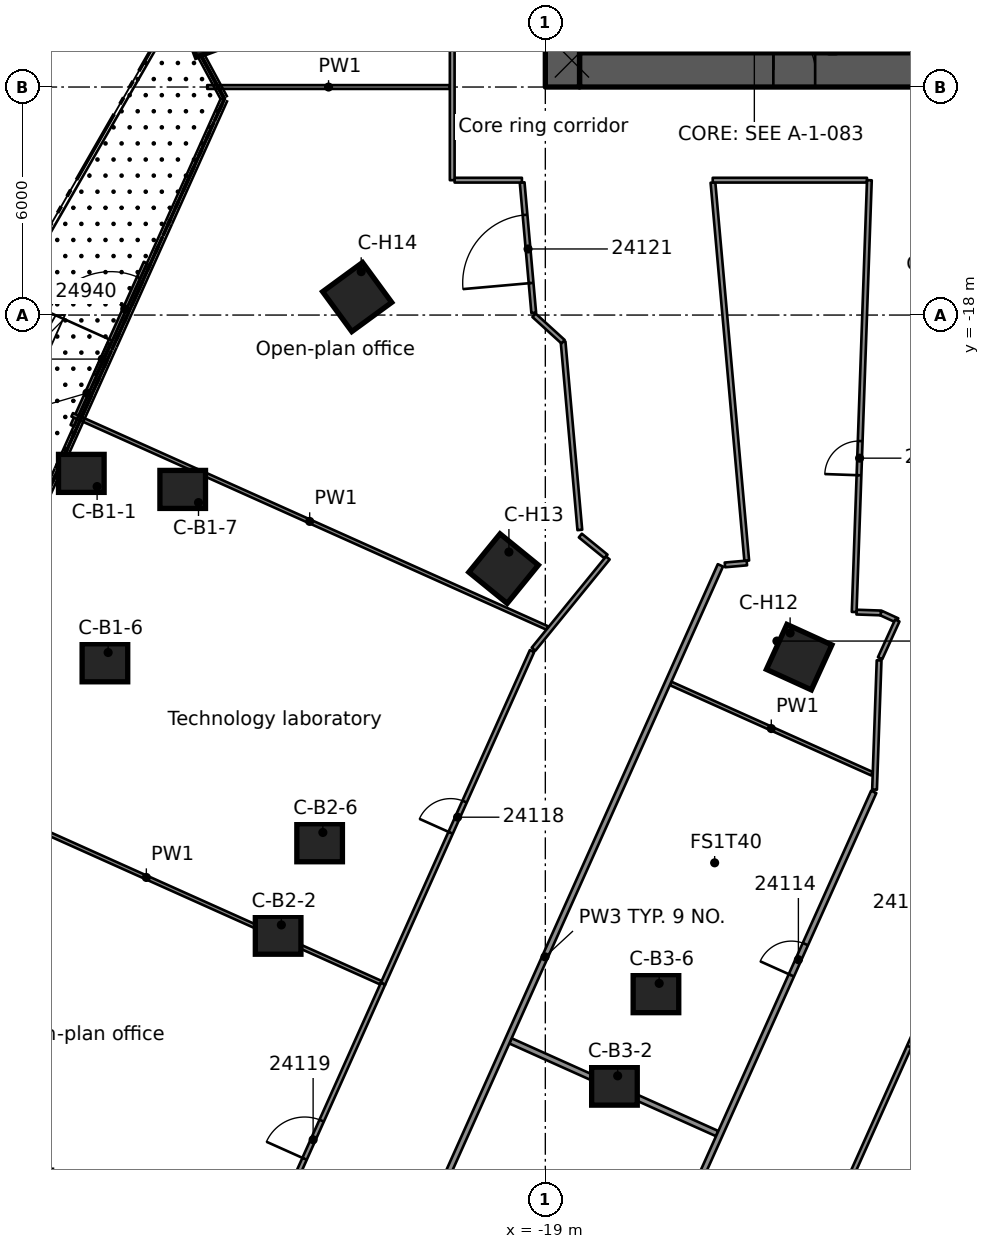
"""IFC4 building model, lengths in metres.
Left out: names, types, materials, properties, quantities, classifications, styles, units other than length and angle.
Written with IfcOpenShell. Run it as: python <this file> out.ifc"""

import sys

from ifc_helpers import new_model, si_unit, direction, frame, frame_2d, origin, origin_2d, place, context, subcontext, project, spatial, rectangle, extrude, element, fill, save


model = new_model("IFC4")
c1 = context("Model", 3, precision=1e-05, world=origin(), true_north=direction((0.0, 1.0)))
c2 = subcontext(c1, "Body", "Model", "MODEL_VIEW")
j1 = project(units=[si_unit("LENGTHUNIT", "METRE"), si_unit("PLANEANGLEUNIT", "RADIAN")], contexts=[c1])
p1 = place(None, origin())
s1 = spatial("IfcSite", under=j1, at=p1, CompositionType="ELEMENT")
p2 = place(p1, origin())
s2 = spatial("IfcBuilding", under=s1, at=p2, CompositionType="ELEMENT")
p3 = place(p2, frame((0.0, 0.0, 123.7)))
s3 = spatial("IfcBuildingStorey", under=s2, at=p3, CompositionType="ELEMENT", Elevation=123.7)
p4 = place(p3, frame((-18.1, -11.55, 0.0), z_axis=(0.0, 0.0, 1.0), x_axis=(1.0, 0.0, 0.0)))
e1 = element("IfcWall", 1, at=p4, inside=s3, PredefinedType="SHEAR", context=c2, shape_type="SweptSolid", body=[
    extrude(rectangle(XDim=9.2, YDim=0.9, at=frame_2d((4.6, 0.0))), origin(), (0.0, 0.0, 1.0), 3.5),
])
p5 = place(p4, frame((5.1, 0.0, 0.0)))
e2 = element("IfcOpeningElement", 2, at=p5, cuts=e1, PredefinedType="OPENING", context=c2, shape_type="SweptSolid", body=[
    extrude(rectangle(XDim=1.1, YDim=2.1, at=frame_2d((0.55, 1.05))), frame((0.0, 0.46, 0.0), z_axis=(0.0, -1.0, 0.0), x_axis=(1.0, 0.0, 0.0)), (0.0, 0.0, 1.0), 0.92),
])
p6 = place(p3, frame((-18.55, -12.0, 0.0), z_axis=(0.0, 0.0, 1.0), x_axis=(0.0, 1.0, 0.0)))
e3 = element("IfcWall", 3, at=p6, inside=s3, PredefinedType="SHEAR", context=c2, shape_type="SweptSolid", body=[
    extrude(rectangle(XDim=24.0, YDim=0.9, at=frame_2d((12.0, 0.0))), origin(), (0.0, 0.0, 1.0), 3.5),
])
p7 = place(p6, frame((10.1, 0.0, 0.0)))
e4 = element("IfcOpeningElement", 4, at=p7, cuts=e3, PredefinedType="OPENING", context=c2, shape_type="SweptSolid", body=[
    extrude(rectangle(XDim=1.8, YDim=2.1, at=frame_2d((0.9, 1.05))), frame((0.0, 0.46, 0.0), z_axis=(0.0, -1.0, 0.0), x_axis=(1.0, 0.0, 0.0)), (0.0, 0.0, 1.0), 0.92),
])
for number, where, z_axis, x_axis in (
    (5, (-31.21, -22.166, 0.0), (0.0, 0.0, 1.0), (1.0, 0.0, 0.0)),
    (6, (-30.589, -27.15, 0.0), (0.0, 0.0, 1.0), (1.0, 0.0, 0.0)),
    (7, (-28.542, -22.588, 0.0), (0.0, 0.0, 1.0), (1.0, 0.0, 0.0)),
    (8, (-26.031, -34.318, 0.0), (0.0, 0.0, 1.0), (1.0, 0.0, 0.0)),
    (9, (-24.939, -31.885, 0.0), (0.0, 0.0, 1.0), (1.0, 0.0, 0.0)),
    (10, (-17.181, -38.289, 0.0), (0.0, 0.0, 1.0), (1.0, 0.0, 0.0)),
    (11, (-16.089, -35.856, 0.0), (0.0, 0.0, 1.0), (1.0, 0.0, 0.0)),
):
    element("IfcColumn", number, at=place(p3, frame(where, z_axis=z_axis, x_axis=x_axis)), inside=s3, PredefinedType="COLUMN", context=c2, shape_type="SweptSolid", body=[
        extrude(rectangle(XDim=1.2, YDim=1.0, at=origin_2d()), origin(), (0.0, 0.0, 1.0), 3.5),
    ])
for number, where, z_axis, x_axis in (
    (12, (-12.321, -27.001, 0.0), (0.0, 0.0, 1.0), (-0.415, -0.91, 0.0)),
    (13, (-20.098, -24.672, 0.0), (0.0, 0.0, 1.0), (-0.632, -0.775, 0.0)),
    (14, (-23.951, -17.526, 0.0), (0.0, 0.0, 1.0), (-0.807, -0.591, 0.0)),
    (15, (-27.804, -10.38, 0.0), (0.0, 0.0, 1.0), (-0.937, -0.35, 0.0)),
):
    element("IfcColumn", number, at=place(p3, frame(where, z_axis=z_axis, x_axis=x_axis)), inside=s3, PredefinedType="COLUMN", context=c2, shape_type="SweptSolid", body=[
        extrude(rectangle(XDim=1.3, YDim=1.3, at=origin_2d()), origin(), (0.0, 0.0, 1.0), 3.5),
    ])
p8 = place(p3, frame((-11.44, -11.1, 0.0), z_axis=(0.0, 0.0, 1.0), x_axis=(0.0, 1.0, 0.0)))
e16 = element("IfcWall", 16, at=p8, inside=s3, PredefinedType="SOLIDWALL", context=c2, shape_type="SweptSolid", body=[
    extrude(rectangle(XDim=4.125, YDim=0.2, at=frame_2d((2.062, 0.0))), origin(), (0.0, 0.0, 1.0), 3.09),
])
p9 = place(p3, frame((-31.447, -20.912, 0.0), z_axis=(0.0, 0.0, 1.0), x_axis=(0.409400034272, 0.912354981319, 0.0)))
e17 = element("IfcWall", 17, at=p9, inside=s3, PredefinedType="STANDARD", context=c2, shape_type="SweptSolid", body=[
    extrude(rectangle(XDim=4.705, YDim=0.1, at=frame_2d((2.353, 0.0))), origin(), (0.0, 0.0, 1.0), 3.1),
])
p10 = place(p9, frame((2.472, 0.0, 0.0)))
e18 = element("IfcOpeningElement", 18, at=p10, cuts=e17, PredefinedType="OPENING", context=c2, shape_type="SweptSolid", body=[
    extrude(rectangle(XDim=1.8, YDim=2.4, at=frame_2d((0.9, 1.2))), frame((0.0, 0.06, 0.0), z_axis=(0.0, -1.0, 0.0), x_axis=(1.0, 0.0, 0.0)), (0.0, 0.0, 1.0), 0.12),
])
p11 = place(p9, frame((1.472, 0.0, 0.0)))
e19 = element("IfcOpeningElement", 19, at=p11, cuts=e17, PredefinedType="OPENING", context=c2, shape_type="SweptSolid", body=[
    extrude(rectangle(XDim=0.9, YDim=2.4, at=frame_2d((0.45, 1.2))), frame((0.0, 0.06, 0.0), z_axis=(0.0, -1.0, 0.0), x_axis=(1.0, 0.0, 0.0)), (0.0, 0.0, 1.0), 0.12),
])
p12 = place(p3, frame((-19.305, -17.942, 0.0), z_axis=(0.0, 0.0, 1.0), x_axis=(-0.088649243985, 0.996062905414, 0.0)))
e20 = element("IfcWall", 20, at=p12, inside=s3, PredefinedType="PARTITIONING", context=c2, shape_type="SweptSolid", body=[
    extrude(rectangle(XDim=3.443, YDim=0.125, at=frame_2d((1.721, 0.0))), origin(), (0.0, 0.0, 1.0), 3.08),
])
p13 = place(p12, frame((0.788, 0.0, 0.0)))
e21 = element("IfcOpeningElement", 21, at=p13, cuts=e20, PredefinedType="OPENING", context=c2, shape_type="SweptSolid", body=[
    extrude(rectangle(XDim=1.8, YDim=2.1, at=frame_2d((0.9, 1.05))), frame((0.0, 0.073, 0.0), z_axis=(0.0, -1.0, 0.0), x_axis=(1.0, 0.0, 0.0)), (0.0, 0.0, 1.0), 0.145),
])
p14 = place(p3, frame((-18.533, -18.702, 0.0), z_axis=(0.0, 0.0, 1.0), x_axis=(0.088684868858, -0.99605973417, 0.0)))
e22 = element("IfcWall", 22, at=p14, inside=s3, PredefinedType="PARTITIONING", context=c2, shape_type="SweptSolid", body=[
    extrude(rectangle(XDim=4.972, YDim=0.125, at=frame_2d((2.486, 0.0))), origin(), (0.0, 0.0, 1.0), 3.08),
])
p15 = place(p3, frame((-14.589, -14.513, 0.0), z_axis=(0.0, 0.0, 1.0), x_axis=(0.088989077037, -0.99603260196, 0.0)))
e23 = element("IfcWall", 23, at=p15, inside=s3, PredefinedType="PARTITIONING", context=c2, shape_type="SweptSolid", body=[
    extrude(rectangle(XDim=9.992, YDim=0.125, at=frame_2d((4.996, 0.0))), origin(), (0.0, 0.0, 1.0), 3.08),
])
p16 = place(p3, frame((-18.079, -23.802, 0.0), z_axis=(0.0, 0.0, 1.0), x_axis=(0.775128356152, -0.631803791923, 0.0)))
e24 = element("IfcWall", 24, at=p16, inside=s3, PredefinedType="PARTITIONING", context=c2, shape_type="SweptSolid", body=[
    extrude(rectangle(XDim=0.872, YDim=0.125, at=frame_2d((0.436, 0.0))), origin(), (0.0, 0.0, 1.0), 3.08),
])
p17 = place(p3, frame((-10.173, -25.838, 0.0), z_axis=(0.0, 0.0, 1.0), x_axis=(0.909209708064, -0.416338452178, 0.0)))
e25 = element("IfcWall", 25, at=p17, inside=s3, PredefinedType="PARTITIONING", context=c2, shape_type="SweptSolid", body=[
    extrude(rectangle(XDim=0.479, YDim=0.125, at=frame_2d((0.239, 0.0))), origin(), (0.0, 0.0, 1.0), 3.08),
])
p18 = place(p3, frame((-39.313, -38.149, 0.0), z_axis=(0.0, 0.0, 1.0), x_axis=(0.912365533099, -0.409376518638, 0.0)))
e26 = element("IfcWall", 26, at=p18, inside=s3, PredefinedType="PARTITIONING", context=c2, shape_type="SweptSolid", body=[
    extrude(rectangle(XDim=13.533, YDim=0.1, at=frame_2d((6.767, 0.0))), origin(), (0.0, 0.0, 1.0), 3.08),
])
p19 = place(p3, frame((-35.67, -30.029, 0.0), z_axis=(0.0, 0.0, 1.0), x_axis=(0.912365708641, -0.409376127413, 0.0)))
e27 = element("IfcWall", 27, at=p19, inside=s3, PredefinedType="PARTITIONING", context=c2, shape_type="SweptSolid", body=[
    extrude(rectangle(XDim=13.528, YDim=0.1, at=frame_2d((6.764, 0.0))), origin(), (0.0, 0.0, 1.0), 3.08),
])
p20 = place(p3, frame((-19.917, -37.098, 0.0), z_axis=(0.0, 0.0, 1.0), x_axis=(0.912388526433, -0.409325270211, 0.0)))
e28 = element("IfcWall", 28, at=p20, inside=s3, PredefinedType="PARTITIONING", context=c2, shape_type="SweptSolid", body=[
    extrude(rectangle(XDim=5.959, YDim=0.15, at=frame_2d((2.979, 0.0))), origin(), (0.0, 0.0, 1.0), 3.08),
])
p21 = place(p3, frame((-31.45, -20.625, 0.0), z_axis=(0.0, 0.0, 1.0), x_axis=(0.912363829072, -0.409380316334, 0.0)))
e29 = element("IfcWall", 29, at=p21, inside=s3, PredefinedType="PARTITIONING", context=c2, shape_type="SweptSolid", body=[
    extrude(rectangle(XDim=13.698, YDim=0.1, at=frame_2d((6.849, 0.0))), origin(), (0.0, 0.0, 1.0), 3.08),
])
p22 = place(p3, frame((-15.704, -27.692, 0.0), z_axis=(0.0, 0.0, 1.0), x_axis=(0.912424912587, -0.409244155597, 0.0)))
e30 = element("IfcWall", 30, at=p22, inside=s3, PredefinedType="PARTITIONING", context=c2, shape_type="SweptSolid", body=[
    extrude(rectangle(XDim=5.809, YDim=0.1, at=frame_2d((2.904, 0.0))), origin(), (0.0, 0.0, 1.0), 3.08),
])
p23 = place(p3, frame((-10.811, -25.816, 0.0), z_axis=(0.0, 0.0, 1.0), x_axis=(0.99940736131, -0.034422756417, 0.0)))
e31 = element("IfcWall", 31, at=p23, inside=s3, PredefinedType="PARTITIONING", context=c2, shape_type="SweptSolid", body=[
    extrude(rectangle(XDim=0.638, YDim=0.125, at=frame_2d((0.319, 0.0))), origin(), (0.0, 0.0, 1.0), 3.08),
])
p24 = place(p3, frame((-21.387, -14.451, 0.0), z_axis=(0.0, 0.0, 1.0), x_axis=(1.0, 0.0, 0.0)))
e32 = element("IfcWall", 32, at=p24, inside=s3, PredefinedType="PARTITIONING", context=c2, shape_type="SweptSolid", body=[
    extrude(rectangle(XDim=1.771, YDim=0.125, at=frame_2d((0.885, 0.0))), origin(), (0.0, 0.0, 1.0), 3.08),
])
p25 = place(p3, frame((-14.595, -14.451, 0.0), z_axis=(0.0, 0.0, 1.0), x_axis=(1.0, 0.0, 0.0)))
e33 = element("IfcWall", 33, at=p25, inside=s3, PredefinedType="PARTITIONING", context=c2, shape_type="SweptSolid", body=[
    extrude(rectangle(XDim=4.059, YDim=0.125, at=frame_2d((2.03, 0.0))), origin(), (0.0, 0.0, 1.0), 3.08),
])
p26 = place(p3, frame((-27.897, -12.0, 0.0), z_axis=(0.0, 0.0, 1.0), x_axis=(1.0, 0.0, 0.0)))
e34 = element("IfcWall", 34, at=p26, inside=s3, PredefinedType="PARTITIONING", context=c2, shape_type="SweptSolid", body=[
    extrude(rectangle(XDim=6.385, YDim=0.1, at=frame_2d((3.192, 0.0))), origin(), (0.0, 0.0, 1.0), 3.08),
])
p27 = place(p3, frame((-14.274, -24.574, 0.0), z_axis=(0.0, 0.0, 1.0), x_axis=(0.996111374158, 0.088102952687, 0.0)))
e35 = element("IfcWall", 35, at=p27, inside=s3, PredefinedType="PARTITIONING", context=c2, shape_type="SweptSolid", body=[
    extrude(rectangle(XDim=0.579, YDim=0.125, at=frame_2d((0.29, 0.0))), origin(), (0.0, 0.0, 1.0), 3.08),
])
p28 = place(p3, frame((-19.298, -18.005, 0.0), z_axis=(0.0, 0.0, 1.0), x_axis=(0.739245917037, -0.673435575348, 0.0)))
e36 = element("IfcWall", 36, at=p28, inside=s3, PredefinedType="PARTITIONING", context=c2, shape_type="SweptSolid", body=[
    extrude(rectangle(XDim=1.035, YDim=0.125, at=frame_2d((0.518, 0.0))), origin(), (0.0, 0.0, 1.0), 3.08),
])
p29 = place(p3, frame((-19.311, -26.793, 0.0), z_axis=(0.0, 0.0, 1.0), x_axis=(0.631476442345, 0.77539506238, 0.0)))
e37 = element("IfcWall", 37, at=p29, inside=s3, PredefinedType="PARTITIONING", context=c2, shape_type="SweptSolid", body=[
    extrude(rectangle(XDim=3.098, YDim=0.125, at=frame_2d((1.549, 0.0))), origin(), (0.0, 0.0, 1.0), 3.08),
])
p30 = place(p3, frame((-10.191, -27.03, 0.0), z_axis=(0.0, 0.0, 1.0), x_axis=(0.414982438297, 0.909829421323, 0.0)))
e38 = element("IfcWall", 38, at=p30, inside=s3, PredefinedType="PARTITIONING", context=c2, shape_type="SweptSolid", body=[
    extrude(rectangle(XDim=1.091, YDim=0.125, at=frame_2d((0.546, 0.0))), origin(), (0.0, 0.0, 1.0), 3.08),
])
p31 = place(p3, frame((-6.789, -31.374, 0.0), z_axis=(0.0, 0.0, 1.0), x_axis=(-0.409354309939, -0.912375497772, 0.0)))
e39 = element("IfcWall", 39, at=p31, inside=s3, PredefinedType="PARTITIONING", context=c2, shape_type="SweptSolid", body=[
    extrude(rectangle(XDim=19.496, YDim=0.125, at=frame_2d((9.748, 0.0))), origin(), (0.0, 0.0, 1.0), 3.08),
])
p32 = place(p31, frame((4.639, 0.0, 0.0)))
e40 = element("IfcOpeningElement", 40, at=p32, cuts=e39, PredefinedType="OPENING", context=c2, shape_type="SweptSolid", body=[
    extrude(rectangle(XDim=1.8, YDim=2.1, at=frame_2d((0.9, 1.05))), frame((0.0, 0.073, 0.0), z_axis=(0.0, -1.0, 0.0), x_axis=(1.0, 0.0, 0.0)), (0.0, 0.0, 1.0), 0.145),
])
p33 = place(p31, frame((14.697, 0.0, 0.0)))
e41 = element("IfcOpeningElement", 41, at=p33, cuts=e39, PredefinedType="OPENING", context=c2, shape_type="SweptSolid", body=[
    extrude(rectangle(XDim=0.9, YDim=2.1, at=frame_2d((0.45, 1.05))), frame((0.0, 0.073, 0.0), z_axis=(0.0, -1.0, 0.0), x_axis=(1.0, 0.0, 0.0)), (0.0, 0.0, 1.0), 0.145),
])
p34 = place(p3, frame((-18.997, -49.786, 0.0), z_axis=(0.0, 0.0, 1.0), x_axis=(0.409621859923, 0.912255409342, 0.0)))
e42 = element("IfcWall", 42, at=p34, inside=s3, PredefinedType="PARTITIONING", context=c2, shape_type="SweptSolid", body=[
    extrude(rectangle(XDim=21.091, YDim=0.15, at=frame_2d((10.545, 0.0))), origin(), (0.0, 0.0, 1.0), 3.08),
])
p35 = place(p34, frame((15.8, 0.0, 0.0)))
e43 = element("IfcOpeningElement", 43, at=p35, cuts=e42, PredefinedType="OPENING", context=c2, shape_type="SweptSolid", body=[
    extrude(rectangle(XDim=0.9, YDim=2.1, at=frame_2d((0.45, 1.05))), frame((0.0, 0.085, 0.0), z_axis=(0.0, -1.0, 0.0), x_axis=(1.0, 0.0, 0.0)), (0.0, 0.0, 1.0), 0.17),
])
p36 = place(p3, frame((-14.393, -24.585, 0.0), z_axis=(0.0, 0.0, 1.0), x_axis=(-0.408859666491, -0.912597267756, 0.0)))
e44 = element("IfcWall", 44, at=p36, inside=s3, PredefinedType="PARTITIONING", context=c2, shape_type="SweptSolid", body=[
    extrude(rectangle(XDim=22.577, YDim=0.15, at=frame_2d((11.289, 0.0))), origin(), (0.0, 0.0, 1.0), 3.08),
])
p37 = place(p36, frame((17.777, 0.0, 0.0)))
e45 = element("IfcOpeningElement", 45, at=p37, cuts=e44, PredefinedType="OPENING", context=c2, shape_type="SweptSolid", body=[
    extrude(rectangle(XDim=0.9, YDim=2.1, at=frame_2d((0.45, 1.05))), frame((0.0, 0.085, 0.0), z_axis=(0.0, -1.0, 0.0), x_axis=(1.0, 0.0, 0.0)), (0.0, 0.0, 1.0), 0.17),
])
p38 = place(p3, frame((-23.271, -35.593, 0.0), z_axis=(0.0, 0.0, 1.0), x_axis=(0.408848301026, 0.9126023596, 0.0)))
e46 = element("IfcWall", 46, at=p38, inside=s3, PredefinedType="PARTITIONING", context=c2, shape_type="SweptSolid", body=[
    extrude(rectangle(XDim=9.59, YDim=0.125, at=frame_2d((4.795, 0.0))), origin(), (0.0, 0.0, 1.0), 3.08),
])
p39 = place(p38, frame((4.35, 0.0, 0.0)))
e47 = element("IfcOpeningElement", 47, at=p39, cuts=e46, PredefinedType="OPENING", context=c2, shape_type="SweptSolid", body=[
    extrude(rectangle(XDim=0.9, YDim=2.1, at=frame_2d((0.45, 1.05))), frame((0.0, 0.073, 0.0), z_axis=(0.0, -1.0, 0.0), x_axis=(1.0, 0.0, 0.0)), (0.0, 0.0, 1.0), 0.145),
])
p40 = place(p3, frame((-26.909, -43.715, 0.0), z_axis=(0.0, 0.0, 1.0), x_axis=(0.408776260382, 0.912634630588, 0.0)))
e48 = element("IfcWall", 48, at=p40, inside=s3, PredefinedType="PARTITIONING", context=c2, shape_type="SweptSolid", body=[
    extrude(rectangle(XDim=8.9, YDim=0.125, at=frame_2d((4.45, 0.0))), origin(), (0.0, 0.0, 1.0), 3.08),
])
p41 = place(p40, frame((3.85, 0.0, 0.0)))
e49 = element("IfcOpeningElement", 49, at=p41, cuts=e48, PredefinedType="OPENING", context=c2, shape_type="SweptSolid", body=[
    extrude(rectangle(XDim=1.1, YDim=2.1, at=frame_2d((0.55, 1.05))), frame((0.0, 0.073, 0.0), z_axis=(0.0, -1.0, 0.0), x_axis=(1.0, 0.0, 0.0)), (0.0, 0.0, 1.0), 0.145),
])
p42 = place(p3, frame((-10.217, -27.087, 0.0), z_axis=(0.0, 0.0, 1.0), x_axis=(-0.035243479781, -0.999378755594, 0.0)))
e50 = element("IfcWall", 50, at=p42, inside=s3, PredefinedType="PARTITIONING", context=c2, shape_type="SweptSolid", body=[
    extrude(rectangle(XDim=3.401, YDim=0.125, at=frame_2d((1.701, 0.0))), origin(), (0.0, 0.0, 1.0), 3.08),
])
p43 = place(p3, frame((-10.873, -25.813, 0.0), z_axis=(0.0, 0.0, 1.0), x_axis=(0.035198976063, 0.999380324043, 0.0)))
e51 = element("IfcWall", 51, at=p43, inside=s3, PredefinedType="PARTITIONING", context=c2, shape_type="SweptSolid", body=[
    extrude(rectangle(XDim=11.368, YDim=0.125, at=frame_2d((5.684, 0.0))), origin(), (0.0, 0.0, 1.0), 3.08),
])
p44 = place(p43, frame((3.6, 0.0, 0.0)))
e52 = element("IfcOpeningElement", 52, at=p44, cuts=e51, PredefinedType="OPENING", context=c2, shape_type="SweptSolid", body=[
    extrude(rectangle(XDim=0.9, YDim=2.1, at=frame_2d((0.45, 1.05))), frame((0.0, 0.073, 0.0), z_axis=(0.0, -1.0, 0.0), x_axis=(1.0, 0.0, 0.0)), (0.0, 0.0, 1.0), 0.145),
])
p45 = place(p3, frame((-21.45, -14.451, 0.0), z_axis=(0.0, 0.0, 1.0), x_axis=(0.0, 1.0, 0.0)))
e53 = element("IfcWall", 53, at=p45, inside=s3, PredefinedType="PARTITIONING", context=c2, shape_type="SweptSolid", body=[
    extrude(rectangle(XDim=28.902, YDim=0.125, at=frame_2d((14.451, 0.0))), origin(), (0.0, 0.0, 1.0), 3.08),
])
p46 = place(p45, frame((8.051, 0.0, 0.0)))
e54 = element("IfcOpeningElement", 54, at=p46, cuts=e53, PredefinedType="OPENING", context=c2, shape_type="SweptSolid", body=[
    extrude(rectangle(XDim=0.9, YDim=2.1, at=frame_2d((0.45, 1.05))), frame((0.0, 0.073, 0.0), z_axis=(0.0, -1.0, 0.0), x_axis=(1.0, 0.0, 0.0)), (0.0, 0.0, 1.0), 0.145),
])
p47 = place(p45, frame((23.052, 0.0, 0.0)))
e55 = element("IfcOpeningElement", 55, at=p47, cuts=e53, PredefinedType="OPENING", context=c2, shape_type="SweptSolid", body=[
    extrude(rectangle(XDim=0.9, YDim=2.1, at=frame_2d((0.45, 1.05))), frame((0.0, 0.073, 0.0), z_axis=(0.0, -1.0, 0.0), x_axis=(1.0, 0.0, 0.0)), (0.0, 0.0, 1.0), 0.145),
])
p48 = place(p45, frame((16.803, 0.0, 0.0)))
e56 = element("IfcOpeningElement", 56, at=p48, cuts=e53, PredefinedType="OPENING", context=c2, shape_type="SweptSolid", body=[
    extrude(rectangle(XDim=1.1, YDim=2.1, at=frame_2d((0.55, 1.05))), frame((0.0, 0.073, 0.0), z_axis=(0.0, -1.0, 0.0), x_axis=(1.0, 0.0, 0.0)), (0.0, 0.0, 1.0), 0.145),
])
p49 = place(p5, origin())
e57 = element("IfcDoor", 57, at=p49, inside=s3, OperationType="SINGLE_SWING_RIGHT", PredefinedType="DOOR", context=c2, shape_type="SweptSolid", body=[
    extrude(rectangle(XDim=1.1, YDim=2.1, at=frame_2d((0.55, 1.05))), frame((0.0, 0.025, 0.0), z_axis=(0.0, -1.0, 0.0), x_axis=(1.0, 0.0, 0.0)), (0.0, 0.0, 1.0), 0.05),
])
fill(e2, e57)
p50 = place(p10, origin())
e58 = element("IfcDoor", 58, at=p50, inside=s3, OperationType="DOUBLE_DOOR_SINGLE_SWING", PredefinedType="DOOR", context=c2, shape_type="SweptSolid", body=[
    extrude(rectangle(XDim=1.8, YDim=2.4, at=frame_2d((0.9, 1.2))), frame((0.0, 0.025, 0.0), z_axis=(0.0, -1.0, 0.0), x_axis=(1.0, 0.0, 0.0)), (0.0, 0.0, 1.0), 0.05),
])
fill(e18, e58)
p51 = place(p11, origin())
e59 = element("IfcWindow", 59, at=p51, inside=s3, PartitioningType="SINGLE_PANEL", PredefinedType="WINDOW", context=c2, shape_type="SweptSolid", body=[
    extrude(rectangle(XDim=0.9, YDim=2.4, at=frame_2d((0.45, 1.2))), frame((0.0, 0.03, 0.0), z_axis=(0.0, -1.0, 0.0), x_axis=(1.0, 0.0, 0.0)), (0.0, 0.0, 1.0), 0.06),
])
fill(e19, e59)
p52 = place(p32, origin())
e60 = element("IfcDoor", 60, at=p52, inside=s3, OperationType="DOUBLE_DOOR_SINGLE_SWING", PredefinedType="DOOR", context=c2, shape_type="SweptSolid", body=[
    extrude(rectangle(XDim=1.8, YDim=2.1, at=frame_2d((0.9, 1.05))), frame((0.0, 0.025, 0.0), z_axis=(0.0, -1.0, 0.0), x_axis=(1.0, 0.0, 0.0)), (0.0, 0.0, 1.0), 0.05),
])
fill(e40, e60)
p53 = place(p35, origin())
e61 = element("IfcDoor", 61, at=p53, inside=s3, OperationType="SINGLE_SWING_RIGHT", PredefinedType="DOOR", context=c2, shape_type="SweptSolid", body=[
    extrude(rectangle(XDim=0.9, YDim=2.1, at=frame_2d((0.45, 1.05))), frame((0.0, 0.025, 0.0), z_axis=(0.0, -1.0, 0.0), x_axis=(1.0, 0.0, 0.0)), (0.0, 0.0, 1.0), 0.05),
])
fill(e43, e61)
p54 = place(p39, origin())
e62 = element("IfcDoor", 62, at=p54, inside=s3, OperationType="SINGLE_SWING_RIGHT", PredefinedType="DOOR", context=c2, shape_type="SweptSolid", body=[
    extrude(rectangle(XDim=0.9, YDim=2.1, at=frame_2d((0.45, 1.05))), frame((0.0, 0.025, 0.0), z_axis=(0.0, -1.0, 0.0), x_axis=(1.0, 0.0, 0.0)), (0.0, 0.0, 1.0), 0.05),
])
fill(e47, e62)
p55 = place(p41, origin())
e63 = element("IfcDoor", 63, at=p55, inside=s3, OperationType="SINGLE_SWING_LEFT", PredefinedType="DOOR", context=c2, shape_type="SweptSolid", body=[
    extrude(rectangle(XDim=1.1, YDim=2.1, at=frame_2d((0.55, 1.05))), frame((0.0, 0.025, 0.0), z_axis=(0.0, -1.0, 0.0), x_axis=(1.0, 0.0, 0.0)), (0.0, 0.0, 1.0), 0.05),
])
fill(e49, e63)
p56 = place(p13, origin())
e64 = element("IfcDoor", 64, at=p56, inside=s3, OperationType="DOUBLE_DOOR_SINGLE_SWING", PredefinedType="DOOR", context=c2, shape_type="SweptSolid", body=[
    extrude(rectangle(XDim=1.8, YDim=2.1, at=frame_2d((0.9, 1.05))), frame((0.0, 0.025, 0.0), z_axis=(0.0, -1.0, 0.0), x_axis=(1.0, 0.0, 0.0)), (0.0, 0.0, 1.0), 0.05),
])
fill(e21, e64)
p57 = place(p44, origin())
e65 = element("IfcDoor", 65, at=p57, inside=s3, OperationType="SINGLE_SWING_LEFT", PredefinedType="DOOR", context=c2, shape_type="SweptSolid", body=[
    extrude(rectangle(XDim=0.9, YDim=2.1, at=frame_2d((0.45, 1.05))), frame((0.0, 0.025, 0.0), z_axis=(0.0, -1.0, 0.0), x_axis=(1.0, 0.0, 0.0)), (0.0, 0.0, 1.0), 0.05),
])
fill(e52, e65)
save(model, sys.argv[1])
